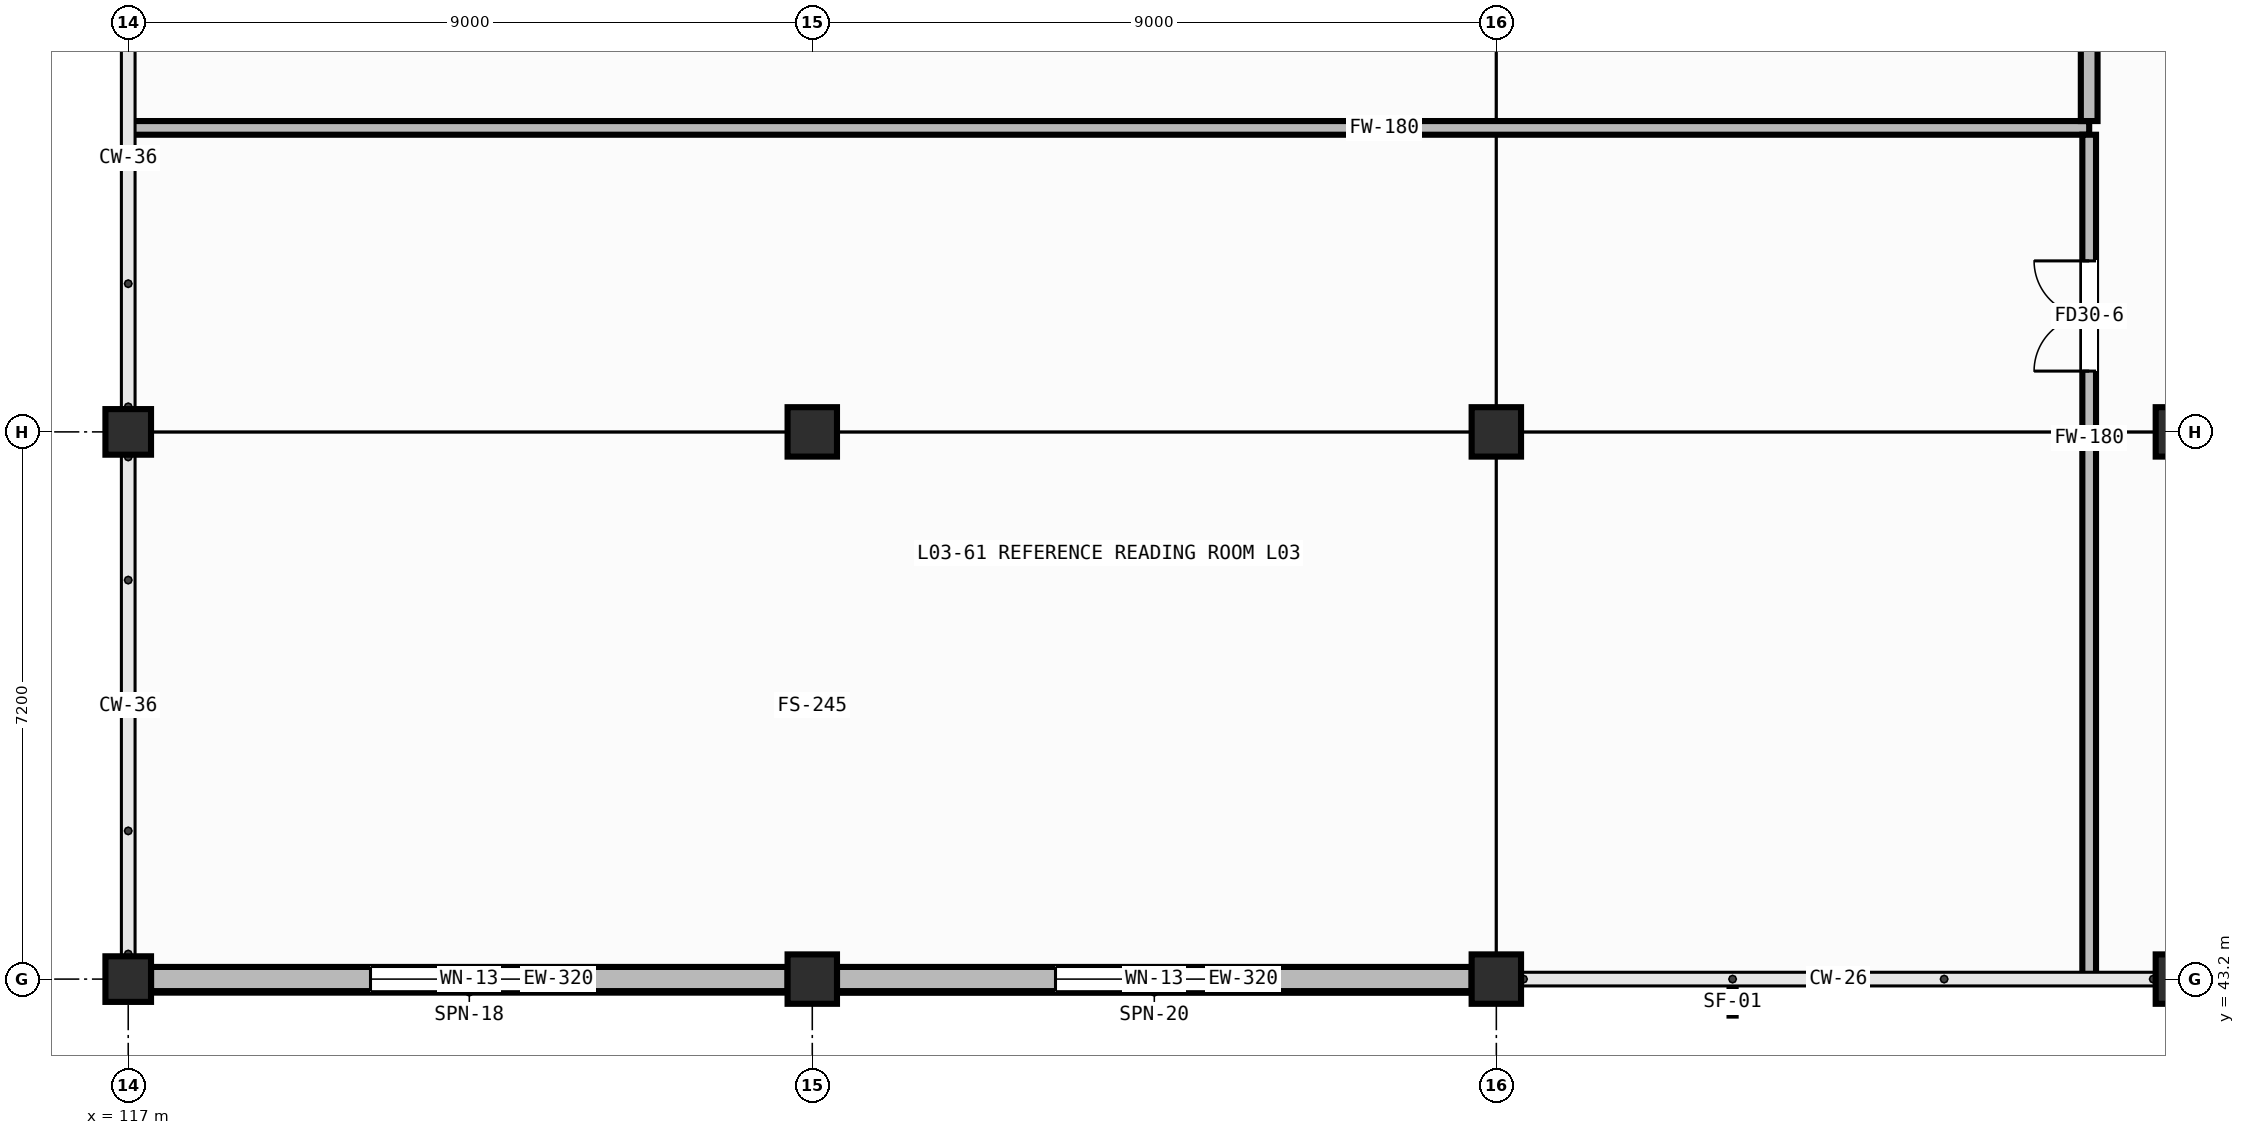
"""IFC4 building model, lengths in metres.
Left out: names, types, materials, properties, quantities, classifications, styles, units other than length and angle.
Written with IfcOpenShell. Run it as: python <this file> out.ifc"""

import sys

from ifc_helpers import new_model, si_unit, direction, frame, frame_2d, origin, origin_2d, place, context, subcontext, project, spatial, rectangle, hollow_rectangle, extrude, element, fill, save


model = new_model("IFC4")
c1 = context("Model", 3, precision=1e-05, world=origin(), true_north=direction((0.0, 1.0)))
c2 = subcontext(c1, "Body", "Model", "MODEL_VIEW")
j1 = project(units=[si_unit("LENGTHUNIT", "METRE"), si_unit("PLANEANGLEUNIT", "RADIAN")], contexts=[c1])
p1 = place(None, origin())
s1 = spatial("IfcSite", under=j1, at=p1, CompositionType="ELEMENT")
p2 = place(p1, origin())
s2 = spatial("IfcBuilding", under=s1, at=p2, CompositionType="ELEMENT")
p3 = place(p2, frame((0.0, 0.0, 8.8)))
s3 = spatial("IfcBuildingStorey", under=s2, at=p3, CompositionType="ELEMENT", Elevation=8.8)
for number, where, z_axis, x_axis in (
    (1, (117.0, 43.2, 0.0), (0.0, 0.0, 1.0), (1.0, 0.0, 0.0)),
    (2, (117.0, 50.4, 0.0), (0.0, 0.0, 1.0), (1.0, 0.0, 0.0)),
):
    element("IfcColumn", number, at=place(p3, frame(where, z_axis=z_axis, x_axis=x_axis)), inside=s3, PredefinedType="COLUMN", context=c2, shape_type="SweptSolid", body=[
        extrude(hollow_rectangle(XDim=0.6, YDim=0.6, WallThickness=0.025, at=origin_2d()), origin(), (0.0, 0.0, 1.0), 4.0),
    ])
for number, where, z_axis, x_axis in (
    (3, (126.0, 43.2, 0.0), (0.0, 0.0, 1.0), (1.0, 0.0, 0.0)),
    (4, (126.0, 50.4, 0.0), (0.0, 0.0, 1.0), (1.0, 0.0, 0.0)),
    (5, (135.0, 43.2, 0.0), (0.0, 0.0, 1.0), (1.0, 0.0, 0.0)),
    (6, (135.0, 50.4, 0.0), (0.0, 0.0, 1.0), (1.0, 0.0, 0.0)),
    (7, (144.0, 43.2, 0.0), (0.0, 0.0, 1.0), (1.0, 0.0, 0.0)),
    (8, (144.0, 50.4, 0.0), (0.0, 0.0, 1.0), (1.0, 0.0, 0.0)),
):
    element("IfcColumn", number, at=place(p3, frame(where, z_axis=z_axis, x_axis=x_axis)), inside=s3, PredefinedType="COLUMN", context=c2, shape_type="SweptSolid", body=[
        extrude(hollow_rectangle(XDim=0.65, YDim=0.65, WallThickness=0.025, at=origin_2d()), origin(), (0.0, 0.0, 1.0), 4.0),
    ])
p4 = place(p3, frame((117.3, 43.2, 0.0), z_axis=(0.0, 0.0, 1.0), x_axis=(1.0, 0.0, 0.0)))
e9 = element("IfcWall", 9, at=p4, inside=s3, PredefinedType="STANDARD", context=c2, shape_type="SweptSolid", body=[
    extrude(rectangle(XDim=8.375, YDim=0.32, at=frame_2d((4.188, 0.0))), origin(), (0.0, 0.0, 1.0), 3.295),
])
p5 = place(p4, frame((2.887, 0.0, 0.85)))
e10 = element("IfcOpeningElement", 10, at=p5, cuts=e9, PredefinedType="OPENING", context=c2, shape_type="SweptSolid", body=[
    extrude(rectangle(XDim=2.6, YDim=1.6, at=frame_2d((1.3, 0.8))), frame((0.0, 0.172, 0.0), z_axis=(0.0, -1.0, 0.0), x_axis=(1.0, 0.0, 0.0)), (0.0, 0.0, 1.0), 0.344),
])
p6 = place(p3, frame((126.325, 43.2, 0.0), z_axis=(0.0, 0.0, 1.0), x_axis=(1.0, 0.0, 0.0)))
e11 = element("IfcWall", 11, at=p6, inside=s3, PredefinedType="STANDARD", context=c2, shape_type="SweptSolid", body=[
    extrude(rectangle(XDim=8.35, YDim=0.32, at=frame_2d((4.175, 0.0))), origin(), (0.0, 0.0, 1.0), 3.295),
])
p7 = place(p6, frame((2.875, 0.0, 0.85)))
e12 = element("IfcOpeningElement", 12, at=p7, cuts=e11, PredefinedType="OPENING", context=c2, shape_type="SweptSolid", body=[
    extrude(rectangle(XDim=2.6, YDim=1.6, at=frame_2d((1.3, 0.8))), frame((0.0, 0.172, 0.0), z_axis=(0.0, -1.0, 0.0), x_axis=(1.0, 0.0, 0.0)), (0.0, 0.0, 1.0), 0.344),
])
p8 = place(p3, frame((117.035, 54.4, 0.0), z_axis=(0.0, 0.0, 1.0), x_axis=(1.0, 0.0, 0.0)))
e13 = element("IfcWall", 13, at=p8, inside=s3, PredefinedType="PARTITIONING", context=c2, shape_type="SweptSolid", body=[
    extrude(rectangle(XDim=25.765, YDim=0.18, at=frame_2d((12.883, 0.0))), origin(), (0.0, 0.0, 1.0), 3.745),
])
p9 = place(p3, frame((142.8, 43.235, 0.0), z_axis=(0.0, 0.0, 1.0), x_axis=(0.0, 1.0, 0.0)))
e14 = element("IfcWall", 14, at=p9, inside=s3, PredefinedType="PARTITIONING", context=c2, shape_type="SweptSolid", body=[
    extrude(rectangle(XDim=11.075, YDim=0.18, at=frame_2d((5.538, 0.0))), origin(), (0.0, 0.0, 1.0), 3.745),
])
p10 = place(p9, frame((7.965, 0.0, 0.0)))
e15 = element("IfcOpeningElement", 15, at=p10, cuts=e14, PredefinedType="OPENING", context=c2, shape_type="SweptSolid", body=[
    extrude(rectangle(XDim=1.45, YDim=2.1, at=frame_2d((0.725, 1.05))), frame((0.0, 0.102, 0.0), z_axis=(0.0, -1.0, 0.0), x_axis=(1.0, 0.0, 0.0)), (0.0, 0.0, 1.0), 0.204),
])
p11 = place(p3, frame((142.8, 54.49, 0.0), z_axis=(0.0, 0.0, 1.0), x_axis=(0.0, 1.0, 0.0)))
e16 = element("IfcWall", 16, at=p11, inside=s3, PredefinedType="PARTITIONING", context=c2, shape_type="SweptSolid", body=[
    extrude(rectangle(XDim=10.82, YDim=0.22, at=frame_2d((5.41, 0.0))), origin(), (0.0, 0.0, 1.0), 3.745),
])
p12 = place(p11, frame((6.035, 0.0, 0.0)))
e17 = element("IfcOpeningElement", 17, at=p12, cuts=e16, PredefinedType="OPENING", context=c2, shape_type="SweptSolid", body=[
    extrude(rectangle(XDim=1.35, YDim=2.08, at=frame_2d((0.675, 1.04))), frame((0.0, 0.122, 0.0), z_axis=(0.0, -1.0, 0.0), x_axis=(1.0, 0.0, 0.0)), (0.0, 0.0, 1.0), 0.244),
])
p13 = place(p5, origin())
e18 = element("IfcWindow", 18, at=p13, inside=s3, PartitioningType="DOUBLE_PANEL_VERTICAL", PredefinedType="WINDOW", context=c2, shape_type="SweptSolid", body=[
    extrude(rectangle(XDim=2.6, YDim=1.6, at=frame_2d((1.3, 0.8))), frame((0.0, 0.03, 0.0), z_axis=(0.0, -1.0, 0.0), x_axis=(1.0, 0.0, 0.0)), (0.0, 0.0, 1.0), 0.06),
])
fill(e10, e18)
p14 = place(p7, origin())
e19 = element("IfcWindow", 19, at=p14, inside=s3, PartitioningType="DOUBLE_PANEL_VERTICAL", PredefinedType="WINDOW", context=c2, shape_type="SweptSolid", body=[
    extrude(rectangle(XDim=2.6, YDim=1.6, at=frame_2d((1.3, 0.8))), frame((0.0, 0.03, 0.0), z_axis=(0.0, -1.0, 0.0), x_axis=(1.0, 0.0, 0.0)), (0.0, 0.0, 1.0), 0.06),
])
fill(e12, e19)
p15 = place(p10, origin())
e20 = element("IfcDoor", 20, at=p15, inside=s3, OperationType="DOUBLE_DOOR_SINGLE_SWING", PredefinedType="DOOR", context=c2, shape_type="SweptSolid", body=[
    extrude(rectangle(XDim=1.45, YDim=2.1, at=frame_2d((0.725, 1.05))), frame((0.0, 0.025, 0.0), z_axis=(0.0, -1.0, 0.0), x_axis=(1.0, 0.0, 0.0)), (0.0, 0.0, 1.0), 0.05),
])
fill(e15, e20)
save(model, sys.argv[1])
